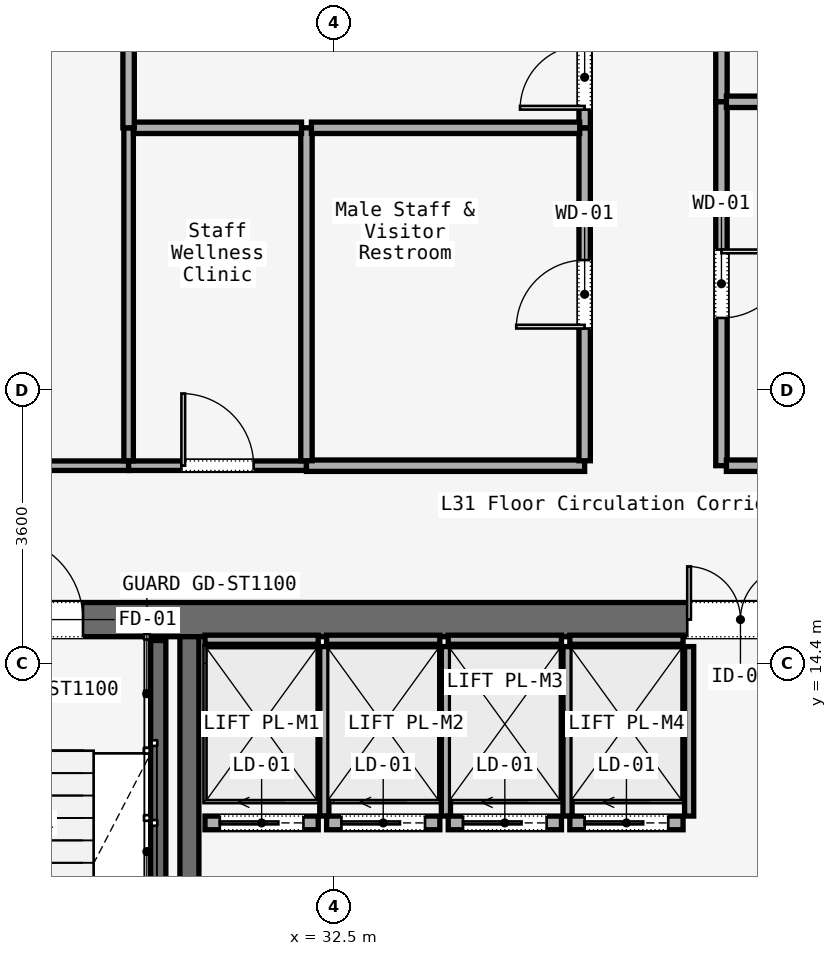
"""IFC4 building model, lengths in metres.
Left out: names, types, materials, properties, quantities, classifications, styles, units other than length and angle.
Written with IfcOpenShell. Run it as: python <this file> out.ifc"""

import sys

from ifc_helpers import new_model, si_unit, direction, frame, frame_2d, origin, place, context, subcontext, project, spatial, rectangle, extrude, element, fill, save


model = new_model("IFC4")
c1 = context("Model", 3, precision=1e-05, world=origin(), true_north=direction((0.0, 1.0)))
c2 = subcontext(c1, "Body", "Model", "MODEL_VIEW")
j1 = project(units=[si_unit("LENGTHUNIT", "METRE"), si_unit("PLANEANGLEUNIT", "RADIAN")], contexts=[c1])
p1 = place(None, origin())
s1 = spatial("IfcSite", under=j1, at=p1, CompositionType="ELEMENT")
p2 = place(p1, origin())
s2 = spatial("IfcBuilding", under=s1, at=p2, CompositionType="ELEMENT")
p3 = place(p2, frame((0.0, 0.0, 134.6)))
s3 = spatial("IfcBuildingStorey", under=s2, at=p3, CompositionType="ELEMENT", Elevation=134.6)
p4 = place(p3, frame((26.45, 14.975, 0.0), z_axis=(0.0, 0.0, 1.0), x_axis=(1.0, 0.0, 0.0)))
e1 = element("IfcWall", 1, at=p4, inside=s3, PredefinedType="SOLIDWALL", context=c2, shape_type="SweptSolid", body=[
    extrude(rectangle(XDim=31.1, YDim=0.45, at=frame_2d((15.55, 0.0))), origin(), (0.0, 0.0, 1.0), 3.58),
])
p5 = place(p4, frame((1.65, 0.0, 0.0)))
e2 = element("IfcOpeningElement", 2, at=p5, cuts=e1, PredefinedType="OPENING", context=c2, shape_type="SweptSolid", body=[
    extrude(rectangle(XDim=1.1, YDim=2.2, at=frame_2d((0.55, 1.1))), frame((0.0, 0.225, 0.0), z_axis=(0.0, -1.0, 0.0), x_axis=(1.0, 0.0, 0.0)), (0.0, 0.0, 1.0), 0.45),
])
p6 = place(p4, frame((13.65, 0.0, 0.0)))
e3 = element("IfcOpeningElement", 3, at=p6, cuts=e1, PredefinedType="OPENING", context=c2, shape_type="SweptSolid", body=[
    extrude(rectangle(XDim=1.1, YDim=2.2, at=frame_2d((0.55, 1.1))), frame((0.0, 0.225, 0.0), z_axis=(0.0, -1.0, 0.0), x_axis=(1.0, 0.0, 0.0)), (0.0, 0.0, 1.0), 0.45),
])
p7 = place(p4, frame((25.55, 0.0, 0.0)))
e4 = element("IfcOpeningElement", 4, at=p7, cuts=e1, PredefinedType="OPENING", context=c2, shape_type="SweptSolid", body=[
    extrude(rectangle(XDim=1.1, YDim=2.2, at=frame_2d((0.55, 1.1))), frame((0.0, 0.225, 0.0), z_axis=(0.0, -1.0, 0.0), x_axis=(1.0, 0.0, 0.0)), (0.0, 0.0, 1.0), 0.45),
])
p8 = place(p4, frame((10.7, 0.0, 0.0)))
e5 = element("IfcOpeningElement", 5, at=p8, cuts=e1, PredefinedType="OPENING", context=c2, shape_type="SweptSolid", body=[
    extrude(rectangle(XDim=1.4, YDim=2.2, at=frame_2d((0.7, 1.1))), frame((0.0, 0.225, 0.0), z_axis=(0.0, -1.0, 0.0), x_axis=(1.0, 0.0, 0.0)), (0.0, 0.0, 1.0), 0.45),
])
p9 = place(p4, frame((19.35, 0.0, 0.0)))
e6 = element("IfcOpeningElement", 6, at=p9, cuts=e1, PredefinedType="OPENING", context=c2, shape_type="SweptSolid", body=[
    extrude(rectangle(XDim=1.1, YDim=2.2, at=frame_2d((0.55, 1.1))), frame((0.0, 0.225, 0.0), z_axis=(0.0, -1.0, 0.0), x_axis=(1.0, 0.0, 0.0)), (0.0, 0.0, 1.0), 0.45),
])
p10 = place(p4, frame((21.4, 0.0, 0.0)))
e7 = element("IfcOpeningElement", 7, at=p10, cuts=e1, PredefinedType="OPENING", context=c2, shape_type="SweptSolid", body=[
    extrude(rectangle(XDim=0.9, YDim=2.1, at=frame_2d((0.45, 1.05))), frame((0.0, 0.225, 0.0), z_axis=(0.0, -1.0, 0.0), x_axis=(1.0, 0.0, 0.0)), (0.0, 0.0, 1.0), 0.45),
])
p11 = place(p4, frame((23.35, 0.0, 0.0)))
e8 = element("IfcOpeningElement", 8, at=p11, cuts=e1, PredefinedType="OPENING", context=c2, shape_type="SweptSolid", body=[
    extrude(rectangle(XDim=1.3, YDim=2.3, at=frame_2d((0.65, 1.15))), frame((0.0, 0.225, 0.0), z_axis=(0.0, -1.0, 0.0), x_axis=(1.0, 0.0, 0.0)), (0.0, 0.0, 1.0), 0.45),
])
p12 = place(p3, frame((30.6, 5.85, 0.0), z_axis=(0.0, 0.0, 1.0), x_axis=(0.0, 1.0, 0.0)))
e9 = element("IfcWall", 9, at=p12, inside=s3, PredefinedType="SOLIDWALL", context=c2, shape_type="SweptSolid", body=[
    extrude(rectangle(XDim=8.9, YDim=0.25, at=frame_2d((4.45, 0.0))), origin(), (0.0, 0.0, 1.0), 3.58),
])
p13 = place(p3, frame((30.19, 14.7, 0.0), z_axis=(0.0, 0.0, 1.0), x_axis=(0.0, -1.0, 0.0)))
e10 = element("IfcWall", 10, at=p13, inside=s3, PredefinedType="SOLIDWALL", context=c2, shape_type="SweptSolid", body=[
    extrude(rectangle(XDim=7.65, YDim=0.2, at=frame_2d((3.825, 0.0))), origin(), (0.0, 0.0, 1.0), 3.8),
])
p14 = place(p3, frame((30.805, 12.3, 0.0), z_axis=(0.0, 0.0, 1.0), x_axis=(1.0, 0.0, 0.0)))
e11 = element("IfcWall", 11, at=p14, inside=s3, PredefinedType="SOLIDWALL", context=c2, shape_type="SweptSolid", body=[
    extrude(rectangle(XDim=1.49, YDim=0.18, at=frame_2d((0.745, 0.0))), origin(), (0.0, 0.0, 1.0), 3.01),
])
p15 = place(p14, frame((0.195, 0.0, 0.0)))
e12 = element("IfcOpeningElement", 12, at=p15, cuts=e11, PredefinedType="OPENING", context=c2, shape_type="SweptSolid", body=[
    extrude(rectangle(XDim=1.1, YDim=2.2, at=frame_2d((0.55, 1.1))), frame((0.0, 0.09, 0.0), z_axis=(0.0, -1.0, 0.0), x_axis=(1.0, 0.0, 0.0)), (0.0, 0.0, 1.0), 0.18),
])
p16 = place(p3, frame((30.805, 14.71, 0.0), z_axis=(0.0, 0.0, 1.0), x_axis=(1.0, 0.0, 0.0)))
e13 = element("IfcWall", 13, at=p16, inside=s3, PredefinedType="SOLIDWALL", context=c2, shape_type="SweptSolid", body=[
    extrude(rectangle(XDim=1.49, YDim=0.12, at=frame_2d((0.745, 0.0))), origin(), (0.0, 0.0, 1.0), 3.01),
])
p17 = place(p3, frame((32.375, 12.39, 0.0), z_axis=(0.0, 0.0, 1.0), x_axis=(0.0, 1.0, 0.0)))
e14 = element("IfcWall", 14, at=p17, inside=s3, PredefinedType="SOLIDWALL", context=c2, shape_type="SweptSolid", body=[
    extrude(rectangle(XDim=2.23, YDim=0.12, at=frame_2d((1.115, 0.0))), origin(), (0.0, 0.0, 1.0), 3.01),
])
p18 = place(p3, frame((32.405, 12.3, 0.0), z_axis=(0.0, 0.0, 1.0), x_axis=(1.0, 0.0, 0.0)))
e15 = element("IfcWall", 15, at=p18, inside=s3, PredefinedType="SOLIDWALL", context=c2, shape_type="SweptSolid", body=[
    extrude(rectangle(XDim=1.49, YDim=0.18, at=frame_2d((0.745, 0.0))), origin(), (0.0, 0.0, 1.0), 3.01),
])
p19 = place(p18, frame((0.195, 0.0, 0.0)))
e16 = element("IfcOpeningElement", 16, at=p19, cuts=e15, PredefinedType="OPENING", context=c2, shape_type="SweptSolid", body=[
    extrude(rectangle(XDim=1.1, YDim=2.2, at=frame_2d((0.55, 1.1))), frame((0.0, 0.09, 0.0), z_axis=(0.0, -1.0, 0.0), x_axis=(1.0, 0.0, 0.0)), (0.0, 0.0, 1.0), 0.18),
])
p20 = place(p3, frame((32.405, 14.71, 0.0), z_axis=(0.0, 0.0, 1.0), x_axis=(1.0, 0.0, 0.0)))
e17 = element("IfcWall", 17, at=p20, inside=s3, PredefinedType="SOLIDWALL", context=c2, shape_type="SweptSolid", body=[
    extrude(rectangle(XDim=1.49, YDim=0.12, at=frame_2d((0.745, 0.0))), origin(), (0.0, 0.0, 1.0), 3.01),
])
p21 = place(p3, frame((33.975, 12.39, 0.0), z_axis=(0.0, 0.0, 1.0), x_axis=(0.0, 1.0, 0.0)))
e18 = element("IfcWall", 18, at=p21, inside=s3, PredefinedType="SOLIDWALL", context=c2, shape_type="SweptSolid", body=[
    extrude(rectangle(XDim=2.23, YDim=0.12, at=frame_2d((1.115, 0.0))), origin(), (0.0, 0.0, 1.0), 3.01),
])
p22 = place(p3, frame((34.005, 12.3, 0.0), z_axis=(0.0, 0.0, 1.0), x_axis=(1.0, 0.0, 0.0)))
e19 = element("IfcWall", 19, at=p22, inside=s3, PredefinedType="SOLIDWALL", context=c2, shape_type="SweptSolid", body=[
    extrude(rectangle(XDim=1.49, YDim=0.18, at=frame_2d((0.745, 0.0))), origin(), (0.0, 0.0, 1.0), 3.01),
])
p23 = place(p22, frame((0.195, 0.0, 0.0)))
e20 = element("IfcOpeningElement", 20, at=p23, cuts=e19, PredefinedType="OPENING", context=c2, shape_type="SweptSolid", body=[
    extrude(rectangle(XDim=1.1, YDim=2.2, at=frame_2d((0.55, 1.1))), frame((0.0, 0.09, 0.0), z_axis=(0.0, -1.0, 0.0), x_axis=(1.0, 0.0, 0.0)), (0.0, 0.0, 1.0), 0.18),
])
p24 = place(p3, frame((34.005, 14.71, 0.0), z_axis=(0.0, 0.0, 1.0), x_axis=(1.0, 0.0, 0.0)))
e21 = element("IfcWall", 21, at=p24, inside=s3, PredefinedType="SOLIDWALL", context=c2, shape_type="SweptSolid", body=[
    extrude(rectangle(XDim=1.49, YDim=0.12, at=frame_2d((0.745, 0.0))), origin(), (0.0, 0.0, 1.0), 3.01),
])
p25 = place(p3, frame((35.575, 12.39, 0.0), z_axis=(0.0, 0.0, 1.0), x_axis=(0.0, 1.0, 0.0)))
e22 = element("IfcWall", 22, at=p25, inside=s3, PredefinedType="SOLIDWALL", context=c2, shape_type="SweptSolid", body=[
    extrude(rectangle(XDim=2.23, YDim=0.12, at=frame_2d((1.115, 0.0))), origin(), (0.0, 0.0, 1.0), 3.01),
])
p26 = place(p3, frame((35.605, 12.3, 0.0), z_axis=(0.0, 0.0, 1.0), x_axis=(1.0, 0.0, 0.0)))
e23 = element("IfcWall", 23, at=p26, inside=s3, PredefinedType="SOLIDWALL", context=c2, shape_type="SweptSolid", body=[
    extrude(rectangle(XDim=1.49, YDim=0.18, at=frame_2d((0.745, 0.0))), origin(), (0.0, 0.0, 1.0), 3.01),
])
p27 = place(p26, frame((0.195, 0.0, 0.0)))
e24 = element("IfcOpeningElement", 24, at=p27, cuts=e23, PredefinedType="OPENING", context=c2, shape_type="SweptSolid", body=[
    extrude(rectangle(XDim=1.1, YDim=2.2, at=frame_2d((0.55, 1.1))), frame((0.0, 0.09, 0.0), z_axis=(0.0, -1.0, 0.0), x_axis=(1.0, 0.0, 0.0)), (0.0, 0.0, 1.0), 0.18),
])
p28 = place(p3, frame((35.605, 14.71, 0.0), z_axis=(0.0, 0.0, 1.0), x_axis=(1.0, 0.0, 0.0)))
e25 = element("IfcWall", 25, at=p28, inside=s3, PredefinedType="SOLIDWALL", context=c2, shape_type="SweptSolid", body=[
    extrude(rectangle(XDim=1.49, YDim=0.12, at=frame_2d((0.745, 0.0))), origin(), (0.0, 0.0, 1.0), 3.01),
])
p29 = place(p3, frame((37.175, 12.39, 0.0), z_axis=(0.0, 0.0, 1.0), x_axis=(0.0, 1.0, 0.0)))
e26 = element("IfcWall", 26, at=p29, inside=s3, PredefinedType="SOLIDWALL", context=c2, shape_type="SweptSolid", body=[
    extrude(rectangle(XDim=2.23, YDim=0.12, at=frame_2d((1.115, 0.0))), origin(), (0.0, 0.0, 1.0), 3.01),
])
p30 = place(p3, frame((25.665, 17.0, 0.0), z_axis=(0.0, 0.0, 1.0), x_axis=(1.0, 0.0, 0.0)))
e27 = element("IfcWall", 27, at=p30, inside=s3, PredefinedType="PARTITIONING", context=c2, shape_type="SweptSolid", body=[
    extrude(rectangle(XDim=4.135, YDim=0.125, at=frame_2d((2.067, 0.0))), origin(), (0.0, 0.0, 1.0), 3.01),
])
p31 = place(p30, frame((1.593, 0.0, 0.0)))
e28 = element("IfcOpeningElement", 28, at=p31, cuts=e27, PredefinedType="OPENING", context=c2, shape_type="SweptSolid", body=[
    extrude(rectangle(XDim=0.95, YDim=2.2, at=frame_2d((0.475, 1.1))), frame((0.0, 0.062, 0.0), z_axis=(0.0, -1.0, 0.0), x_axis=(1.0, 0.0, 0.0)), (0.0, 0.0, 1.0), 0.125),
])
p32 = place(p3, frame((29.8, 17.0, 0.0), z_axis=(0.0, 0.0, 1.0), x_axis=(1.0, 0.0, 0.0)))
e29 = element("IfcWall", 29, at=p32, inside=s3, PredefinedType="PARTITIONING", context=c2, shape_type="SweptSolid", body=[
    extrude(rectangle(XDim=2.34, YDim=0.125, at=frame_2d((1.17, 0.0))), origin(), (0.0, 0.0, 1.0), 3.01),
])
p33 = place(p32, frame((0.695, 0.0, 0.0)))
e30 = element("IfcOpeningElement", 30, at=p33, cuts=e29, PredefinedType="OPENING", context=c2, shape_type="SweptSolid", body=[
    extrude(rectangle(XDim=0.95, YDim=2.2, at=frame_2d((0.475, 1.1))), frame((0.0, 0.062, 0.0), z_axis=(0.0, -1.0, 0.0), x_axis=(1.0, 0.0, 0.0)), (0.0, 0.0, 1.0), 0.125),
])
p34 = place(p3, frame((32.14, 17.0, 0.0), z_axis=(0.0, 0.0, 1.0), x_axis=(1.0, 0.0, 0.0)))
e31 = element("IfcWall", 31, at=p34, inside=s3, PredefinedType="PARTITIONING", context=c2, shape_type="SweptSolid", body=[
    extrude(rectangle(XDim=3.66, YDim=0.15, at=frame_2d((1.83, 0.0))), origin(), (0.0, 0.0, 1.0), 3.01),
])
p35 = place(p3, frame((35.8, 17.065, 0.0), z_axis=(0.0, 0.0, 1.0), x_axis=(0.0, 1.0, 0.0)))
e32 = element("IfcWall", 32, at=p35, inside=s3, PredefinedType="PARTITIONING", context=c2, shape_type="SweptSolid", body=[
    extrude(rectangle(XDim=4.381, YDim=0.15, at=frame_2d((2.19, 0.0))), origin(), (0.0, 0.0, 1.0), 3.01),
])
p36 = place(p35, frame((1.74, 0.0, 0.0)))
e33 = element("IfcOpeningElement", 33, at=p36, cuts=e32, PredefinedType="OPENING", context=c2, shape_type="SweptSolid", body=[
    extrude(rectangle(XDim=0.9, YDim=2.15, at=frame_2d((0.45, 1.075))), frame((0.0, 0.075, 0.0), z_axis=(0.0, -1.0, 0.0), x_axis=(1.0, 0.0, 0.0)), (0.0, 0.0, 1.0), 0.15),
])
p37 = place(p3, frame((35.8, 21.446, 0.0), z_axis=(0.0, 0.0, 1.0), x_axis=(0.0, 1.0, 0.0)))
e34 = element("IfcWall", 34, at=p37, inside=s3, PredefinedType="PARTITIONING", context=c2, shape_type="SweptSolid", body=[
    extrude(rectangle(XDim=3.129, YDim=0.15, at=frame_2d((1.564, 0.0))), origin(), (0.0, 0.0, 1.0), 3.01),
])
p38 = place(p37, frame((0.24, 0.0, 0.0)))
e35 = element("IfcOpeningElement", 35, at=p38, cuts=e34, PredefinedType="OPENING", context=c2, shape_type="SweptSolid", body=[
    extrude(rectangle(XDim=0.85, YDim=2.15, at=frame_2d((0.425, 1.075))), frame((0.0, 0.075, 0.0), z_axis=(0.0, -1.0, 0.0), x_axis=(1.0, 0.0, 0.0)), (0.0, 0.0, 1.0), 0.15),
])
p39 = place(p3, frame((37.6, 24.565, 0.0), z_axis=(0.0, 0.0, 1.0), x_axis=(0.0, -1.0, 0.0)))
e36 = element("IfcWall", 36, at=p39, inside=s3, PredefinedType="PARTITIONING", context=c2, shape_type="SweptSolid", body=[
    extrude(rectangle(XDim=2.777, YDim=0.15, at=frame_2d((1.388, 0.0))), origin(), (0.0, 0.0, 1.0), 3.01),
])
p40 = place(p39, frame((0.914, 0.0, 0.0)))
e37 = element("IfcOpeningElement", 37, at=p40, cuts=e36, PredefinedType="OPENING", context=c2, shape_type="SweptSolid", body=[
    extrude(rectangle(XDim=0.95, YDim=2.2, at=frame_2d((0.475, 1.1))), frame((0.0, 0.075, 0.0), z_axis=(0.0, -1.0, 0.0), x_axis=(1.0, 0.0, 0.0)), (0.0, 0.0, 1.0), 0.15),
])
p41 = place(p3, frame((37.6, 21.788, 0.0), z_axis=(0.0, 0.0, 1.0), x_axis=(0.0, -1.0, 0.0)))
e38 = element("IfcWall", 38, at=p41, inside=s3, PredefinedType="PARTITIONING", context=c2, shape_type="SweptSolid", body=[
    extrude(rectangle(XDim=4.788, YDim=0.15, at=frame_2d((2.394, 0.0))), origin(), (0.0, 0.0, 1.0), 3.01),
])
p42 = place(p41, frame((1.944, 0.0, 0.0)))
e39 = element("IfcOpeningElement", 39, at=p42, cuts=e38, PredefinedType="OPENING", context=c2, shape_type="SweptSolid", body=[
    extrude(rectangle(XDim=0.9, YDim=2.15, at=frame_2d((0.45, 1.075))), frame((0.0, 0.075, 0.0), z_axis=(0.0, -1.0, 0.0), x_axis=(1.0, 0.0, 0.0)), (0.0, 0.0, 1.0), 0.15),
])
p43 = place(p3, frame((37.665, 17.0, 0.0), z_axis=(0.0, 0.0, 1.0), x_axis=(1.0, 0.0, 0.0)))
e40 = element("IfcWall", 40, at=p43, inside=s3, PredefinedType="PARTITIONING", context=c2, shape_type="SweptSolid", body=[
    extrude(rectangle(XDim=3.715, YDim=0.15, at=frame_2d((1.857, 0.0))), origin(), (0.0, 0.0, 1.0), 3.01),
])
p44 = place(p3, frame((32.14, 21.446, 0.0), z_axis=(0.0, 0.0, 1.0), x_axis=(0.0, -1.0, 0.0)))
e41 = element("IfcWall", 41, at=p44, inside=s3, PredefinedType="PARTITIONING", context=c2, shape_type="SweptSolid", body=[
    extrude(rectangle(XDim=4.381, YDim=0.15, at=frame_2d((2.19, 0.0))), origin(), (0.0, 0.0, 1.0), 3.01),
])
p45 = place(p3, frame((29.8, 17.065, 0.0), z_axis=(0.0, 0.0, 1.0), x_axis=(0.0, 1.0, 0.0)))
e42 = element("IfcWall", 42, at=p45, inside=s3, PredefinedType="PARTITIONING", context=c2, shape_type="SweptSolid", body=[
    extrude(rectangle(XDim=4.381, YDim=0.125, at=frame_2d((2.19, 0.0))), origin(), (0.0, 0.0, 1.0), 3.01),
])
p46 = place(p3, frame((29.865, 21.446, 0.0), z_axis=(0.0, 0.0, 1.0), x_axis=(1.0, 0.0, 0.0)))
e43 = element("IfcWall", 43, at=p46, inside=s3, PredefinedType="PARTITIONING", context=c2, shape_type="SweptSolid", body=[
    extrude(rectangle(XDim=2.21, YDim=0.15, at=frame_2d((1.105, 0.0))), origin(), (0.0, 0.0, 1.0), 3.01),
])
p47 = place(p3, frame((32.205, 21.446, 0.0), z_axis=(0.0, 0.0, 1.0), x_axis=(1.0, 0.0, 0.0)))
e44 = element("IfcWall", 44, at=p47, inside=s3, PredefinedType="PARTITIONING", context=c2, shape_type="SweptSolid", body=[
    extrude(rectangle(XDim=3.53, YDim=0.15, at=frame_2d((1.765, 0.0))), origin(), (0.0, 0.0, 1.0), 3.01),
])
p48 = place(p3, frame((37.665, 21.788, 0.0), z_axis=(0.0, 0.0, 1.0), x_axis=(1.0, 0.0, 0.0)))
e45 = element("IfcWall", 45, at=p48, inside=s3, PredefinedType="PARTITIONING", context=c2, shape_type="SweptSolid", body=[
    extrude(rectangle(XDim=3.65, YDim=0.15, at=frame_2d((1.825, 0.0))), origin(), (0.0, 0.0, 1.0), 3.01),
])
p49 = place(p3, frame((29.8, 24.575, 0.0), z_axis=(0.0, 0.0, 1.0), x_axis=(0.0, -1.0, 0.0)))
e46 = element("IfcWall", 46, at=p49, inside=s3, PredefinedType="PARTITIONING", context=c2, shape_type="SweptSolid", body=[
    extrude(rectangle(XDim=3.129, YDim=0.15, at=frame_2d((1.564, 0.0))), origin(), (0.0, 0.0, 1.0), 3.01),
])
p50 = place(p5, origin())
e47 = element("IfcDoor", 47, at=p50, inside=s3, OperationType="SINGLE_SWING_RIGHT", PredefinedType="DOOR", context=c2, shape_type="SweptSolid", body=[
    extrude(rectangle(XDim=1.1, YDim=2.2, at=frame_2d((0.55, 1.1))), frame((0.0, 0.025, 0.0), z_axis=(0.0, -1.0, 0.0), x_axis=(1.0, 0.0, 0.0)), (0.0, 0.0, 1.0), 0.05),
])
fill(e2, e47)
p51 = place(p8, origin())
e48 = element("IfcDoor", 48, at=p51, inside=s3, OperationType="DOUBLE_DOOR_SINGLE_SWING", PredefinedType="DOOR", context=c2, shape_type="SweptSolid", body=[
    extrude(rectangle(XDim=1.4, YDim=2.2, at=frame_2d((0.7, 1.1))), frame((0.0, 0.025, 0.0), z_axis=(0.0, -1.0, 0.0), x_axis=(1.0, 0.0, 0.0)), (0.0, 0.0, 1.0), 0.05),
])
fill(e5, e48)
p52 = place(p15, origin())
e49 = element("IfcDoor", 49, at=p52, inside=s3, OperationType="SLIDING_TO_LEFT", PredefinedType="DOOR", context=c2, shape_type="SweptSolid", body=[
    extrude(rectangle(XDim=1.1, YDim=2.2, at=frame_2d((0.55, 1.1))), frame((0.0, 0.025, 0.0), z_axis=(0.0, -1.0, 0.0), x_axis=(1.0, 0.0, 0.0)), (0.0, 0.0, 1.0), 0.05),
])
fill(e12, e49)
p53 = place(p19, origin())
e50 = element("IfcDoor", 50, at=p53, inside=s3, OperationType="SLIDING_TO_LEFT", PredefinedType="DOOR", context=c2, shape_type="SweptSolid", body=[
    extrude(rectangle(XDim=1.1, YDim=2.2, at=frame_2d((0.55, 1.1))), frame((0.0, 0.025, 0.0), z_axis=(0.0, -1.0, 0.0), x_axis=(1.0, 0.0, 0.0)), (0.0, 0.0, 1.0), 0.05),
])
fill(e16, e50)
p54 = place(p23, origin())
e51 = element("IfcDoor", 51, at=p54, inside=s3, OperationType="SLIDING_TO_LEFT", PredefinedType="DOOR", context=c2, shape_type="SweptSolid", body=[
    extrude(rectangle(XDim=1.1, YDim=2.2, at=frame_2d((0.55, 1.1))), frame((0.0, 0.025, 0.0), z_axis=(0.0, -1.0, 0.0), x_axis=(1.0, 0.0, 0.0)), (0.0, 0.0, 1.0), 0.05),
])
fill(e20, e51)
p55 = place(p27, origin())
e52 = element("IfcDoor", 52, at=p55, inside=s3, OperationType="SLIDING_TO_LEFT", PredefinedType="DOOR", context=c2, shape_type="SweptSolid", body=[
    extrude(rectangle(XDim=1.1, YDim=2.2, at=frame_2d((0.55, 1.1))), frame((0.0, 0.025, 0.0), z_axis=(0.0, -1.0, 0.0), x_axis=(1.0, 0.0, 0.0)), (0.0, 0.0, 1.0), 0.05),
])
fill(e24, e52)
p56 = place(p33, origin())
e53 = element("IfcDoor", 53, at=p56, inside=s3, OperationType="SINGLE_SWING_RIGHT", PredefinedType="DOOR", context=c2, shape_type="SweptSolid", body=[
    extrude(rectangle(XDim=0.95, YDim=2.2, at=frame_2d((0.475, 1.1))), frame((0.0, 0.025, 0.0), z_axis=(0.0, -1.0, 0.0), x_axis=(1.0, 0.0, 0.0)), (0.0, 0.0, 1.0), 0.05),
])
fill(e30, e53)
p57 = place(p36, origin())
e54 = element("IfcDoor", 54, at=p57, inside=s3, OperationType="SINGLE_SWING_LEFT", PredefinedType="DOOR", context=c2, shape_type="SweptSolid", body=[
    extrude(rectangle(XDim=0.9, YDim=2.15, at=frame_2d((0.45, 1.075))), frame((0.0, 0.025, 0.0), z_axis=(0.0, -1.0, 0.0), x_axis=(1.0, 0.0, 0.0)), (0.0, 0.0, 1.0), 0.05),
])
fill(e33, e54)
p58 = place(p42, origin())
e55 = element("IfcDoor", 55, at=p58, inside=s3, OperationType="SINGLE_SWING_RIGHT", PredefinedType="DOOR", context=c2, shape_type="SweptSolid", body=[
    extrude(rectangle(XDim=0.9, YDim=2.15, at=frame_2d((0.45, 1.075))), frame((0.0, 0.025, 0.0), z_axis=(0.0, -1.0, 0.0), x_axis=(1.0, 0.0, 0.0)), (0.0, 0.0, 1.0), 0.05),
])
fill(e39, e55)
p59 = place(p38, origin())
e56 = element("IfcDoor", 56, at=p59, inside=s3, OperationType="SINGLE_SWING_LEFT", PredefinedType="DOOR", context=c2, shape_type="SweptSolid", body=[
    extrude(rectangle(XDim=0.85, YDim=2.15, at=frame_2d((0.425, 1.075))), frame((0.0, 0.025, 0.0), z_axis=(0.0, -1.0, 0.0), x_axis=(1.0, 0.0, 0.0)), (0.0, 0.0, 1.0), 0.05),
])
fill(e35, e56)
save(model, sys.argv[1])
